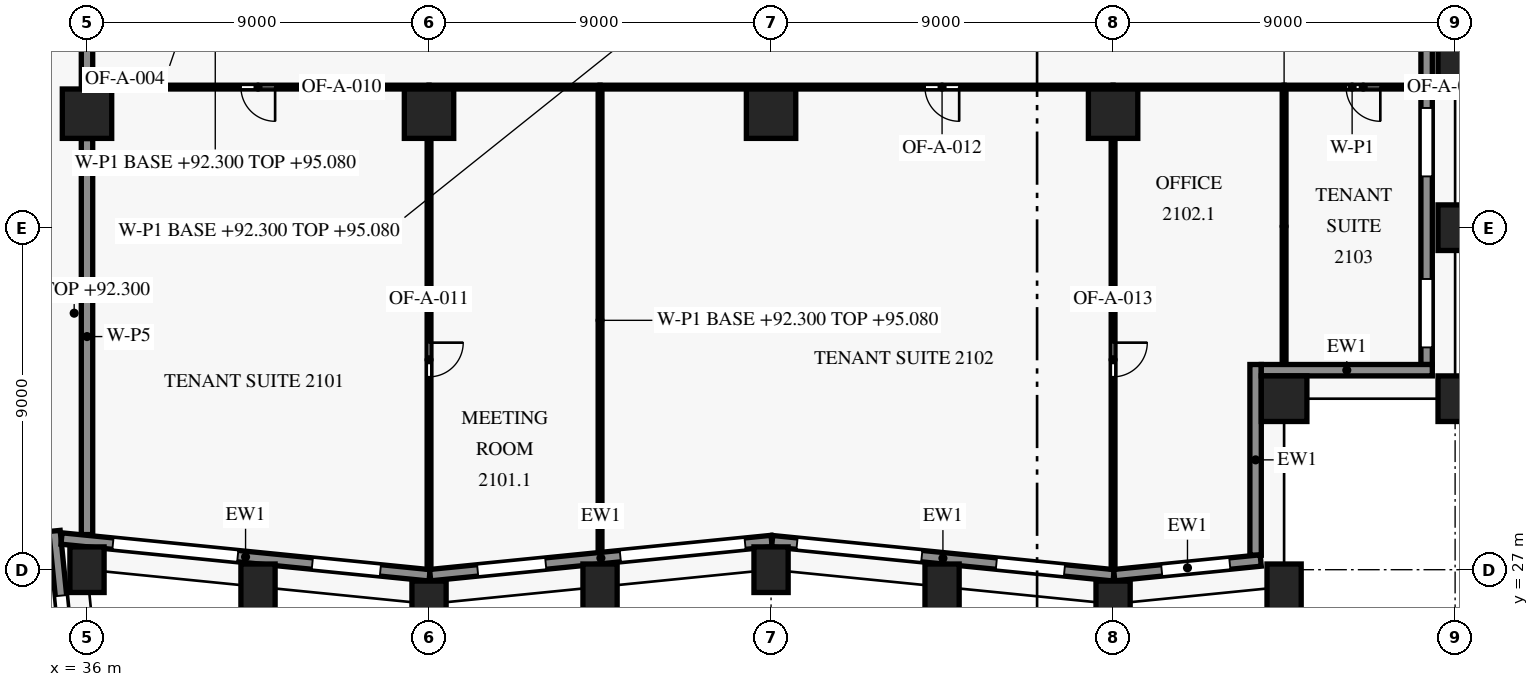
"""IFC4 building model, lengths in metres.
Left out: names, types, materials, properties, quantities, classifications, styles, units other than length and angle.
Written with IfcOpenShell. Run it as: python <this file> out.ifc"""

import sys

from ifc_helpers import new_model, si_unit, direction, frame, frame_2d, origin, origin_2d, place, context, subcontext, project, spatial, rectangle, extrude, element, fill, save


model = new_model("IFC4")
c1 = context("Model", 3, precision=1e-05, world=origin(), true_north=direction((0.0, 1.0)))
c2 = subcontext(c1, "Body", "Model", "MODEL_VIEW")
j1 = project(units=[si_unit("LENGTHUNIT", "METRE"), si_unit("PLANEANGLEUNIT", "RADIAN")], contexts=[c1])
p1 = place(None, origin())
s1 = spatial("IfcSite", under=j1, at=p1, CompositionType="ELEMENT")
p2 = place(p1, origin())
s2 = spatial("IfcBuilding", under=s1, at=p2, CompositionType="ELEMENT")
p3 = place(p2, frame((0.0, 0.0, 92.3)))
s3 = spatial("IfcBuildingStorey", under=s2, at=p3, CompositionType="ELEMENT", Elevation=92.3)
for number, where, z_axis, x_axis in (
    (1, (36.0, 27.0, 0.0), (0.0, 0.0, 1.0), (-0.1, 0.995, 0.0)),
    (2, (40.5, 26.55, 0.0), (0.0, 0.0, 1.0), (0.995, -0.1, 0.0)),
    (3, (45.0, 26.1, 0.0), (0.0, 0.0, 1.0), (1.0, 0.0, 0.0)),
    (4, (49.5, 26.55, 0.0), (0.0, 0.0, 1.0), (0.995, 0.1, 0.0)),
    (5, (54.0, 27.0, 0.0), (0.0, 0.0, 1.0), (1.0, 0.0, 0.0)),
    (6, (58.5, 26.55, 0.0), (0.0, 0.0, 1.0), (0.995, -0.1, 0.0)),
    (7, (63.0, 26.1, 0.0), (0.0, 0.0, 1.0), (1.0, 0.0, 0.0)),
    (8, (67.5, 26.55, 0.0), (0.0, 0.0, 1.0), (0.995, 0.1, 0.0)),
    (9, (72.0, 31.5, 0.0), (0.0, 0.0, 1.0), (0.0, 1.0, 0.0)),
    (10, (72.0, 36.0, 0.0), (0.0, 0.0, 1.0), (0.0, 1.0, 0.0)),
    (11, (72.0, 40.5, 0.0), (0.0, 0.0, 1.0), (0.0, 1.0, 0.0)),
):
    element("IfcColumn", number, at=place(p3, frame(where, z_axis=z_axis, x_axis=x_axis)), inside=s3, PredefinedType="COLUMN", context=c2, shape_type="SweptSolid", body=[
        extrude(rectangle(XDim=0.9, YDim=1.2, at=origin_2d()), origin(), (0.0, 0.0, 1.0), 3.8),
    ])
p4 = place(p3, frame((67.5, 31.5, 0.0), z_axis=(0.0, 0.0, 1.0), x_axis=(1.0, 0.0, 0.0)))
e12 = element("IfcColumn", 12, at=p4, inside=s3, PredefinedType="COLUMN", context=c2, shape_type="SweptSolid", body=[
    extrude(rectangle(XDim=1.2, YDim=1.2, at=origin_2d()), origin(), (0.0, 0.0, 1.0), 3.8),
])
for number, where, z_axis, x_axis in (
    (13, (36.0, 39.0, 0.0), (0.0, 0.0, 1.0), (1.0, 0.0, 0.0)),
    (14, (45.0, 39.0, 0.0), (0.0, 0.0, 1.0), (1.0, 0.0, 0.0)),
    (15, (54.0, 39.0, 0.0), (0.0, 0.0, 1.0), (1.0, 0.0, 0.0)),
    (16, (63.0, 39.0, 0.0), (0.0, 0.0, 1.0), (1.0, 0.0, 0.0)),
):
    element("IfcColumn", number, at=place(p3, frame(where, z_axis=z_axis, x_axis=x_axis)), inside=s3, PredefinedType="COLUMN", context=c2, shape_type="SweptSolid", body=[
        extrude(rectangle(XDim=1.3, YDim=1.3, at=origin_2d()), origin(), (0.0, 0.0, 1.0), 3.8),
    ])
p5 = place(p3, frame((35.144, 28.02, 0.0), z_axis=(0.0, 0.0, 1.0), x_axis=(0.099503719021, -0.99503719021, 0.0)))
e17 = element("IfcWall", 17, at=p5, inside=s3, PredefinedType="SOLIDWALL", context=c2, shape_type="SweptSolid", body=[
    extrude(rectangle(XDim=10.04, YDim=0.3, at=frame_2d((5.02, 0.0))), origin(), (0.0, 0.0, 1.0), 3.15),
])
p6 = place(p5, frame((1.711, 0.0, 0.15)))
e18 = element("IfcOpeningElement", 18, at=p6, cuts=e17, PredefinedType="OPENING", context=c2, shape_type="SweptSolid", body=[
    extrude(rectangle(XDim=3.3, YDim=2.4, at=frame_2d((1.65, 1.2))), frame((0.0, 0.16, 0.0), z_axis=(0.0, -1.0, 0.0), x_axis=(1.0, 0.0, 0.0)), (0.0, 0.0, 1.0), 0.32),
])
p7 = place(p5, frame((6.984, 0.0, 0.75)))
e19 = element("IfcOpeningElement", 19, at=p7, cuts=e17, PredefinedType="OPENING", context=c2, shape_type="SweptSolid", body=[
    extrude(rectangle(XDim=1.8, YDim=1.8, at=frame_2d((0.9, 0.9))), frame((0.0, 0.16, 0.0), z_axis=(0.0, -1.0, 0.0), x_axis=(1.0, 0.0, 0.0)), (0.0, 0.0, 1.0), 0.32),
])
p8 = place(p3, frame((45.015, 26.852, 0.0), z_axis=(0.0, 0.0, 1.0), x_axis=(-0.995037438546, 0.099501235631, 0.0)))
e20 = element("IfcWall", 20, at=p8, inside=s3, PredefinedType="SOLIDWALL", context=c2, shape_type="SweptSolid", body=[
    extrude(rectangle(XDim=9.734, YDim=0.3, at=frame_2d((4.867, 0.0))), origin(), (0.0, 0.0, 1.0), 3.15),
])
p9 = place(p8, frame((1.301, 0.0, 0.75)))
e21 = element("IfcOpeningElement", 21, at=p9, cuts=e20, PredefinedType="OPENING", context=c2, shape_type="SweptSolid", body=[
    extrude(rectangle(XDim=1.8, YDim=1.8, at=frame_2d((0.9, 0.9))), frame((0.0, 0.16, 0.0), z_axis=(0.0, -1.0, 0.0), x_axis=(1.0, 0.0, 0.0)), (0.0, 0.0, 1.0), 0.32),
])
p10 = place(p8, frame((5.073, 0.0, 0.15)))
e22 = element("IfcOpeningElement", 22, at=p10, cuts=e20, PredefinedType="OPENING", context=c2, shape_type="SweptSolid", body=[
    extrude(rectangle(XDim=3.3, YDim=2.4, at=frame_2d((1.65, 1.2))), frame((0.0, 0.16, 0.0), z_axis=(0.0, -1.0, 0.0), x_axis=(1.0, 0.0, 0.0)), (0.0, 0.0, 1.0), 0.32),
])
p11 = place(p3, frame((54.015, 27.755, 0.0), z_axis=(0.0, 0.0, 1.0), x_axis=(-0.995037993253, -0.099495688264, 0.0)))
e23 = element("IfcWall", 23, at=p11, inside=s3, PredefinedType="SOLIDWALL", context=c2, shape_type="SweptSolid", body=[
    extrude(rectangle(XDim=9.03, YDim=0.3, at=frame_2d((4.515, 0.0))), origin(), (0.0, 0.0, 1.0), 3.15),
])
p12 = place(p11, frame((0.701, 0.0, 0.15)))
e24 = element("IfcOpeningElement", 24, at=p12, cuts=e23, PredefinedType="OPENING", context=c2, shape_type="SweptSolid", body=[
    extrude(rectangle(XDim=3.3, YDim=2.4, at=frame_2d((1.65, 1.2))), frame((0.0, 0.16, 0.0), z_axis=(0.0, -1.0, 0.0), x_axis=(1.0, 0.0, 0.0)), (0.0, 0.0, 1.0), 0.32),
])
p13 = place(p11, frame((5.974, 0.0, 0.75)))
e25 = element("IfcOpeningElement", 25, at=p13, cuts=e23, PredefinedType="OPENING", context=c2, shape_type="SweptSolid", body=[
    extrude(rectangle(XDim=1.8, YDim=1.8, at=frame_2d((0.9, 0.9))), frame((0.0, 0.16, 0.0), z_axis=(0.0, -1.0, 0.0), x_axis=(1.0, 0.0, 0.0)), (0.0, 0.0, 1.0), 0.32),
])
p14 = place(p3, frame((63.015, 26.852, 0.0), z_axis=(0.0, 0.0, 1.0), x_axis=(-0.995037993253, 0.099495688264, 0.0)))
e26 = element("IfcWall", 26, at=p14, inside=s3, PredefinedType="SOLIDWALL", context=c2, shape_type="SweptSolid", body=[
    extrude(rectangle(XDim=9.03, YDim=0.3, at=frame_2d((4.515, 0.0))), origin(), (0.0, 0.0, 1.0), 3.15),
])
p15 = place(p14, frame((1.301, 0.0, 0.75)))
e27 = element("IfcOpeningElement", 27, at=p15, cuts=e26, PredefinedType="OPENING", context=c2, shape_type="SweptSolid", body=[
    extrude(rectangle(XDim=1.8, YDim=1.8, at=frame_2d((0.9, 0.9))), frame((0.0, 0.16, 0.0), z_axis=(0.0, -1.0, 0.0), x_axis=(1.0, 0.0, 0.0)), (0.0, 0.0, 1.0), 0.32),
])
p16 = place(p14, frame((5.073, 0.0, 0.15)))
e28 = element("IfcOpeningElement", 28, at=p16, cuts=e26, PredefinedType="OPENING", context=c2, shape_type="SweptSolid", body=[
    extrude(rectangle(XDim=3.3, YDim=2.4, at=frame_2d((1.65, 1.2))), frame((0.0, 0.16, 0.0), z_axis=(0.0, -1.0, 0.0), x_axis=(1.0, 0.0, 0.0)), (0.0, 0.0, 1.0), 0.32),
])
p17 = place(p3, frame((66.885, 27.242, 0.0), z_axis=(0.0, 0.0, 1.0), x_axis=(-0.995037814081, -0.099497480111, 0.0)))
e29 = element("IfcWall", 29, at=p17, inside=s3, PredefinedType="SOLIDWALL", context=c2, shape_type="SweptSolid", body=[
    extrude(rectangle(XDim=3.875, YDim=0.3, at=frame_2d((1.937, 0.0))), origin(), (0.0, 0.0, 1.0), 3.15),
])
p18 = place(p17, frame((0.818, 0.0, 0.75)))
e30 = element("IfcOpeningElement", 30, at=p18, cuts=e29, PredefinedType="OPENING", context=c2, shape_type="SweptSolid", body=[
    extrude(rectangle(XDim=1.8, YDim=1.8, at=frame_2d((0.9, 0.9))), frame((0.0, 0.16, 0.0), z_axis=(0.0, -1.0, 0.0), x_axis=(1.0, 0.0, 0.0)), (0.0, 0.0, 1.0), 0.32),
])
p19 = place(p3, frame((66.75, 32.4, 0.0), z_axis=(0.0, 0.0, 1.0), x_axis=(0.0, -1.0, 0.0)))
e31 = element("IfcWall", 31, at=p19, inside=s3, PredefinedType="SOLIDWALL", context=c2, shape_type="SweptSolid", body=[
    extrude(rectangle(XDim=5.019, YDim=0.3, at=frame_2d((2.51, 0.0))), origin(), (0.0, 0.0, 1.0), 3.15),
])
p20 = place(p3, frame((71.4, 32.25, 0.0), z_axis=(0.0, 0.0, 1.0), x_axis=(-1.0, 0.0, 0.0)))
e32 = element("IfcWall", 32, at=p20, inside=s3, PredefinedType="SOLIDWALL", context=c2, shape_type="SweptSolid", body=[
    extrude(rectangle(XDim=4.5, YDim=0.3, at=frame_2d((2.25, 0.0))), origin(), (0.0, 0.0, 1.0), 3.15),
])
p21 = place(p3, frame((71.25, 57.9, 0.0), z_axis=(0.0, 0.0, 1.0), x_axis=(0.0, -1.0, 0.0)))
e33 = element("IfcWall", 33, at=p21, inside=s3, PredefinedType="SOLIDWALL", context=c2, shape_type="SweptSolid", body=[
    extrude(rectangle(XDim=25.502, YDim=0.3, at=frame_2d((12.751, 0.0))), origin(), (0.0, 0.0, 1.0), 3.15),
])
p22 = place(p21, frame((0.75, 0.0, 0.75)))
e34 = element("IfcOpeningElement", 34, at=p22, cuts=e33, PredefinedType="OPENING", context=c2, shape_type="SweptSolid", body=[
    extrude(rectangle(XDim=1.8, YDim=1.8, at=frame_2d((0.9, 0.9))), frame((0.0, 0.16, 0.0), z_axis=(0.0, -1.0, 0.0), x_axis=(1.0, 0.0, 0.0)), (0.0, 0.0, 1.0), 0.32),
])
p23 = place(p21, frame((5.25, 0.0, 0.75)))
e35 = element("IfcOpeningElement", 35, at=p23, cuts=e33, PredefinedType="OPENING", context=c2, shape_type="SweptSolid", body=[
    extrude(rectangle(XDim=1.8, YDim=1.8, at=frame_2d((0.9, 0.9))), frame((0.0, 0.16, 0.0), z_axis=(0.0, -1.0, 0.0), x_axis=(1.0, 0.0, 0.0)), (0.0, 0.0, 1.0), 0.32),
])
p24 = place(p21, frame((9.0, 0.0, 0.15)))
e36 = element("IfcOpeningElement", 36, at=p24, cuts=e33, PredefinedType="OPENING", context=c2, shape_type="SweptSolid", body=[
    extrude(rectangle(XDim=3.3, YDim=2.4, at=frame_2d((1.65, 1.2))), frame((0.0, 0.16, 0.0), z_axis=(0.0, -1.0, 0.0), x_axis=(1.0, 0.0, 0.0)), (0.0, 0.0, 1.0), 0.32),
])
p25 = place(p21, frame((13.5, 0.0, 0.15)))
e37 = element("IfcOpeningElement", 37, at=p25, cuts=e33, PredefinedType="OPENING", context=c2, shape_type="SweptSolid", body=[
    extrude(rectangle(XDim=3.3, YDim=2.4, at=frame_2d((1.65, 1.2))), frame((0.0, 0.16, 0.0), z_axis=(0.0, -1.0, 0.0), x_axis=(1.0, 0.0, 0.0)), (0.0, 0.0, 1.0), 0.32),
])
p26 = place(p21, frame((18.75, 0.0, 0.75)))
e38 = element("IfcOpeningElement", 38, at=p26, cuts=e33, PredefinedType="OPENING", context=c2, shape_type="SweptSolid", body=[
    extrude(rectangle(XDim=1.8, YDim=1.8, at=frame_2d((0.9, 0.9))), frame((0.0, 0.16, 0.0), z_axis=(0.0, -1.0, 0.0), x_axis=(1.0, 0.0, 0.0)), (0.0, 0.0, 1.0), 0.32),
])
p27 = place(p21, frame((23.25, 0.0, 0.75)))
e39 = element("IfcOpeningElement", 39, at=p27, cuts=e33, PredefinedType="OPENING", context=c2, shape_type="SweptSolid", body=[
    extrude(rectangle(XDim=1.8, YDim=1.8, at=frame_2d((0.9, 0.9))), frame((0.0, 0.16, 0.0), z_axis=(0.0, -1.0, 0.0), x_axis=(1.0, 0.0, 0.0)), (0.0, 0.0, 1.0), 0.32),
])
for number, where, z_axis, x_axis in (
    (40, (24.655, 27.0, 0.0), (0.0, 0.0, 1.0), (1.0, 0.0, 0.0)),
    (41, (36.0, 27.925, 0.0), (0.0, 0.0, 1.0), (0.0, 1.0, 0.0)),
):
    element("IfcWall", number, at=place(p3, frame(where, z_axis=z_axis, x_axis=x_axis)), inside=s3, PredefinedType="PARTITIONING", context=c2, shape_type="SweptSolid", body=[
        extrude(rectangle(XDim=10.42, YDim=0.3, at=frame_2d((5.21, 0.0))), origin(), (0.0, 0.0, 1.0), 2.78),
    ])
p28 = place(p3, frame((45.0, 38.345, 0.0), z_axis=(0.0, 0.0, 1.0), x_axis=(0.0, -1.0, 0.0)))
e42 = element("IfcWall", 42, at=p28, inside=s3, PredefinedType="PARTITIONING", context=c2, shape_type="SweptSolid", body=[
    extrude(rectangle(XDim=11.321, YDim=0.1, at=frame_2d((5.66, 0.0))), origin(), (0.0, 0.0, 1.0), 2.88),
])
p29 = place(p28, frame((5.37, 0.0, 0.0)))
e43 = element("IfcOpeningElement", 43, at=p29, cuts=e42, PredefinedType="OPENING", context=c2, shape_type="SweptSolid", body=[
    extrude(rectangle(XDim=0.9, YDim=2.1, at=frame_2d((0.45, 1.05))), frame((0.0, 0.06, 0.0), z_axis=(0.0, -1.0, 0.0), x_axis=(1.0, 0.0, 0.0)), (0.0, 0.0, 1.0), 0.12),
])
p30 = place(p3, frame((63.0, 38.345, 0.0), z_axis=(0.0, 0.0, 1.0), x_axis=(0.0, -1.0, 0.0)))
e44 = element("IfcWall", 44, at=p30, inside=s3, PredefinedType="PARTITIONING", context=c2, shape_type="SweptSolid", body=[
    extrude(rectangle(XDim=11.321, YDim=0.1, at=frame_2d((5.66, 0.0))), origin(), (0.0, 0.0, 1.0), 2.88),
])
p31 = place(p30, frame((5.37, 0.0, 0.0)))
e45 = element("IfcOpeningElement", 45, at=p31, cuts=e44, PredefinedType="OPENING", context=c2, shape_type="SweptSolid", body=[
    extrude(rectangle(XDim=0.9, YDim=2.1, at=frame_2d((0.45, 1.05))), frame((0.0, 0.06, 0.0), z_axis=(0.0, -1.0, 0.0), x_axis=(1.0, 0.0, 0.0)), (0.0, 0.0, 1.0), 0.12),
])
p32 = place(p3, frame((49.5, 39.65, 0.0), z_axis=(0.0, 0.0, 1.0), x_axis=(0.0, -1.0, 0.0)))
e46 = element("IfcWall", 46, at=p32, inside=s3, PredefinedType="PARTITIONING", context=c2, shape_type="SweptSolid", body=[
    extrude(rectangle(XDim=12.175, YDim=0.1, at=frame_2d((6.088, 0.0))), origin(), (0.0, 0.0, 1.0), 2.78),
])
p33 = place(p3, frame((67.5, 39.65, 0.0), z_axis=(0.0, 0.0, 1.0), x_axis=(0.0, -1.0, 0.0)))
e47 = element("IfcWall", 47, at=p33, inside=s3, PredefinedType="PARTITIONING", context=c2, shape_type="SweptSolid", body=[
    extrude(rectangle(XDim=7.23, YDim=0.1, at=frame_2d((3.615, 0.0))), origin(), (0.0, 0.0, 1.0), 2.78),
])
p34 = place(p3, frame((45.0, 39.7, 0.0), z_axis=(0.0, 0.0, 1.0), x_axis=(-1.0, 0.0, 0.0)))
e48 = element("IfcWall", 48, at=p34, inside=s3, PredefinedType="PARTITIONING", context=c2, shape_type="SweptSolid", body=[
    extrude(rectangle(XDim=8.95, YDim=0.1, at=frame_2d((4.475, 0.0))), origin(), (0.0, 0.0, 1.0), 2.78),
])
p35 = place(p34, frame((4.05, 0.0, 0.0)))
e49 = element("IfcOpeningElement", 49, at=p35, cuts=e48, PredefinedType="OPENING", context=c2, shape_type="SweptSolid", body=[
    extrude(rectangle(XDim=0.9, YDim=2.1, at=frame_2d((0.45, 1.05))), frame((0.0, 0.06, 0.0), z_axis=(0.0, -1.0, 0.0), x_axis=(1.0, 0.0, 0.0)), (0.0, 0.0, 1.0), 0.12),
])
p36 = place(p3, frame((49.5, 39.7, 0.0), z_axis=(0.0, 0.0, 1.0), x_axis=(-1.0, 0.0, 0.0)))
e50 = element("IfcWall", 50, at=p36, inside=s3, PredefinedType="PARTITIONING", context=c2, shape_type="SweptSolid", body=[
    extrude(rectangle(XDim=4.5, YDim=0.1, at=frame_2d((2.25, 0.0))), origin(), (0.0, 0.0, 1.0), 2.88),
])
p37 = place(p3, frame((63.0, 39.7, 0.0), z_axis=(0.0, 0.0, 1.0), x_axis=(-1.0, 0.0, 0.0)))
e51 = element("IfcWall", 51, at=p37, inside=s3, PredefinedType="PARTITIONING", context=c2, shape_type="SweptSolid", body=[
    extrude(rectangle(XDim=13.5, YDim=0.1, at=frame_2d((6.75, 0.0))), origin(), (0.0, 0.0, 1.0), 2.88),
])
p38 = place(p37, frame((4.05, 0.0, 0.0)))
e52 = element("IfcOpeningElement", 52, at=p38, cuts=e51, PredefinedType="OPENING", context=c2, shape_type="SweptSolid", body=[
    extrude(rectangle(XDim=0.9, YDim=2.1, at=frame_2d((0.45, 1.05))), frame((0.0, 0.06, 0.0), z_axis=(0.0, -1.0, 0.0), x_axis=(1.0, 0.0, 0.0)), (0.0, 0.0, 1.0), 0.12),
])
p39 = place(p3, frame((67.5, 39.7, 0.0), z_axis=(0.0, 0.0, 1.0), x_axis=(-1.0, 0.0, 0.0)))
e53 = element("IfcWall", 53, at=p39, inside=s3, PredefinedType="PARTITIONING", context=c2, shape_type="SweptSolid", body=[
    extrude(rectangle(XDim=4.5, YDim=0.1, at=frame_2d((2.25, 0.0))), origin(), (0.0, 0.0, 1.0), 2.88),
])
p40 = place(p3, frame((71.08, 39.7, 0.0), z_axis=(0.0, 0.0, 1.0), x_axis=(-1.0, 0.0, 0.0)))
e54 = element("IfcWall", 54, at=p40, inside=s3, PredefinedType="PARTITIONING", context=c2, shape_type="SweptSolid", body=[
    extrude(rectangle(XDim=3.58, YDim=0.1, at=frame_2d((1.79, 0.0))), origin(), (0.0, 0.0, 1.0), 3.48),
])
p41 = place(p40, frame((1.048, 0.0, 0.0)))
e55 = element("IfcOpeningElement", 55, at=p41, cuts=e54, PredefinedType="OPENING", context=c2, shape_type="SweptSolid", body=[
    extrude(rectangle(XDim=0.9, YDim=2.1, at=frame_2d((0.45, 1.05))), frame((0.0, 0.06, 0.0), z_axis=(0.0, -1.0, 0.0), x_axis=(1.0, 0.0, 0.0)), (0.0, 0.0, 1.0), 0.12),
])
p42 = place(p3, frame((36.0, 39.67, 0.0), z_axis=(0.0, 0.0, 1.0), x_axis=(0.0, 1.0, 0.0)))
e56 = element("IfcWall", 56, at=p42, inside=s3, PredefinedType="PARTITIONING", context=c2, shape_type="SweptSolid", body=[
    extrude(rectangle(XDim=3.18, YDim=0.3, at=frame_2d((1.59, 0.0))), origin(), (0.0, 0.0, 1.0), 2.78),
])
p43 = place(p6, origin())
e57 = element("IfcWindow", 57, at=p43, inside=s3, PartitioningType="SINGLE_PANEL", PredefinedType="WINDOW", context=c2, shape_type="SweptSolid", body=[
    extrude(rectangle(XDim=3.3, YDim=2.4, at=frame_2d((1.65, 1.2))), frame((0.0, 0.03, 0.0), z_axis=(0.0, -1.0, 0.0), x_axis=(1.0, 0.0, 0.0)), (0.0, 0.0, 1.0), 0.06),
])
fill(e18, e57)
p44 = place(p9, origin())
e58 = element("IfcWindow", 58, at=p44, inside=s3, PartitioningType="SINGLE_PANEL", PredefinedType="WINDOW", context=c2, shape_type="SweptSolid", body=[
    extrude(rectangle(XDim=1.8, YDim=1.8, at=frame_2d((0.9, 0.9))), frame((0.0, 0.03, 0.0), z_axis=(0.0, -1.0, 0.0), x_axis=(1.0, 0.0, 0.0)), (0.0, 0.0, 1.0), 0.06),
])
fill(e21, e58)
p45 = place(p10, origin())
e59 = element("IfcWindow", 59, at=p45, inside=s3, PartitioningType="SINGLE_PANEL", PredefinedType="WINDOW", context=c2, shape_type="SweptSolid", body=[
    extrude(rectangle(XDim=3.3, YDim=2.4, at=frame_2d((1.65, 1.2))), frame((0.0, 0.03, 0.0), z_axis=(0.0, -1.0, 0.0), x_axis=(1.0, 0.0, 0.0)), (0.0, 0.0, 1.0), 0.06),
])
fill(e22, e59)
p46 = place(p12, origin())
e60 = element("IfcWindow", 60, at=p46, inside=s3, PartitioningType="SINGLE_PANEL", PredefinedType="WINDOW", context=c2, shape_type="SweptSolid", body=[
    extrude(rectangle(XDim=3.3, YDim=2.4, at=frame_2d((1.65, 1.2))), frame((0.0, 0.03, 0.0), z_axis=(0.0, -1.0, 0.0), x_axis=(1.0, 0.0, 0.0)), (0.0, 0.0, 1.0), 0.06),
])
fill(e24, e60)
p47 = place(p13, origin())
e61 = element("IfcWindow", 61, at=p47, inside=s3, PartitioningType="SINGLE_PANEL", PredefinedType="WINDOW", context=c2, shape_type="SweptSolid", body=[
    extrude(rectangle(XDim=1.8, YDim=1.8, at=frame_2d((0.9, 0.9))), frame((0.0, 0.03, 0.0), z_axis=(0.0, -1.0, 0.0), x_axis=(1.0, 0.0, 0.0)), (0.0, 0.0, 1.0), 0.06),
])
fill(e25, e61)
p48 = place(p15, origin())
e62 = element("IfcWindow", 62, at=p48, inside=s3, PartitioningType="SINGLE_PANEL", PredefinedType="WINDOW", context=c2, shape_type="SweptSolid", body=[
    extrude(rectangle(XDim=1.8, YDim=1.8, at=frame_2d((0.9, 0.9))), frame((0.0, 0.03, 0.0), z_axis=(0.0, -1.0, 0.0), x_axis=(1.0, 0.0, 0.0)), (0.0, 0.0, 1.0), 0.06),
])
fill(e27, e62)
p49 = place(p16, origin())
e63 = element("IfcWindow", 63, at=p49, inside=s3, PartitioningType="SINGLE_PANEL", PredefinedType="WINDOW", context=c2, shape_type="SweptSolid", body=[
    extrude(rectangle(XDim=3.3, YDim=2.4, at=frame_2d((1.65, 1.2))), frame((0.0, 0.03, 0.0), z_axis=(0.0, -1.0, 0.0), x_axis=(1.0, 0.0, 0.0)), (0.0, 0.0, 1.0), 0.06),
])
fill(e28, e63)
p50 = place(p18, origin())
e64 = element("IfcWindow", 64, at=p50, inside=s3, PartitioningType="SINGLE_PANEL", PredefinedType="WINDOW", context=c2, shape_type="SweptSolid", body=[
    extrude(rectangle(XDim=1.8, YDim=1.8, at=frame_2d((0.9, 0.9))), frame((0.0, 0.03, 0.0), z_axis=(0.0, -1.0, 0.0), x_axis=(1.0, 0.0, 0.0)), (0.0, 0.0, 1.0), 0.06),
])
fill(e30, e64)
p51 = place(p26, origin())
e65 = element("IfcWindow", 65, at=p51, inside=s3, PartitioningType="SINGLE_PANEL", PredefinedType="WINDOW", context=c2, shape_type="SweptSolid", body=[
    extrude(rectangle(XDim=1.8, YDim=1.8, at=frame_2d((0.9, 0.9))), frame((0.0, 0.03, 0.0), z_axis=(0.0, -1.0, 0.0), x_axis=(1.0, 0.0, 0.0)), (0.0, 0.0, 1.0), 0.06),
])
fill(e38, e65)
p52 = place(p27, origin())
e66 = element("IfcWindow", 66, at=p52, inside=s3, PartitioningType="SINGLE_PANEL", PredefinedType="WINDOW", context=c2, shape_type="SweptSolid", body=[
    extrude(rectangle(XDim=1.8, YDim=1.8, at=frame_2d((0.9, 0.9))), frame((0.0, 0.03, 0.0), z_axis=(0.0, -1.0, 0.0), x_axis=(1.0, 0.0, 0.0)), (0.0, 0.0, 1.0), 0.06),
])
fill(e39, e66)
p53 = place(p35, origin())
e67 = element("IfcDoor", 67, at=p53, inside=s3, OperationType="SINGLE_SWING_LEFT", PredefinedType="DOOR", context=c2, shape_type="SweptSolid", body=[
    extrude(rectangle(XDim=0.9, YDim=2.1, at=frame_2d((0.45, 1.05))), frame((0.0, 0.025, 0.0), z_axis=(0.0, -1.0, 0.0), x_axis=(1.0, 0.0, 0.0)), (0.0, 0.0, 1.0), 0.05),
])
fill(e49, e67)
p54 = place(p29, origin())
e68 = element("IfcDoor", 68, at=p54, inside=s3, OperationType="SINGLE_SWING_LEFT", PredefinedType="DOOR", context=c2, shape_type="SweptSolid", body=[
    extrude(rectangle(XDim=0.9, YDim=2.1, at=frame_2d((0.45, 1.05))), frame((0.0, 0.025, 0.0), z_axis=(0.0, -1.0, 0.0), x_axis=(1.0, 0.0, 0.0)), (0.0, 0.0, 1.0), 0.05),
])
fill(e43, e68)
p55 = place(p38, origin())
e69 = element("IfcDoor", 69, at=p55, inside=s3, OperationType="SINGLE_SWING_LEFT", PredefinedType="DOOR", context=c2, shape_type="SweptSolid", body=[
    extrude(rectangle(XDim=0.9, YDim=2.1, at=frame_2d((0.45, 1.05))), frame((0.0, 0.025, 0.0), z_axis=(0.0, -1.0, 0.0), x_axis=(1.0, 0.0, 0.0)), (0.0, 0.0, 1.0), 0.05),
])
fill(e52, e69)
p56 = place(p31, origin())
e70 = element("IfcDoor", 70, at=p56, inside=s3, OperationType="SINGLE_SWING_LEFT", PredefinedType="DOOR", context=c2, shape_type="SweptSolid", body=[
    extrude(rectangle(XDim=0.9, YDim=2.1, at=frame_2d((0.45, 1.05))), frame((0.0, 0.025, 0.0), z_axis=(0.0, -1.0, 0.0), x_axis=(1.0, 0.0, 0.0)), (0.0, 0.0, 1.0), 0.05),
])
fill(e45, e70)
p57 = place(p41, origin())
e71 = element("IfcDoor", 71, at=p57, inside=s3, OperationType="SINGLE_SWING_LEFT", PredefinedType="DOOR", context=c2, shape_type="SweptSolid", body=[
    extrude(rectangle(XDim=0.9, YDim=2.1, at=frame_2d((0.45, 1.05))), frame((0.0, 0.025, 0.0), z_axis=(0.0, -1.0, 0.0), x_axis=(1.0, 0.0, 0.0)), (0.0, 0.0, 1.0), 0.05),
])
fill(e55, e71)
save(model, sys.argv[1])
